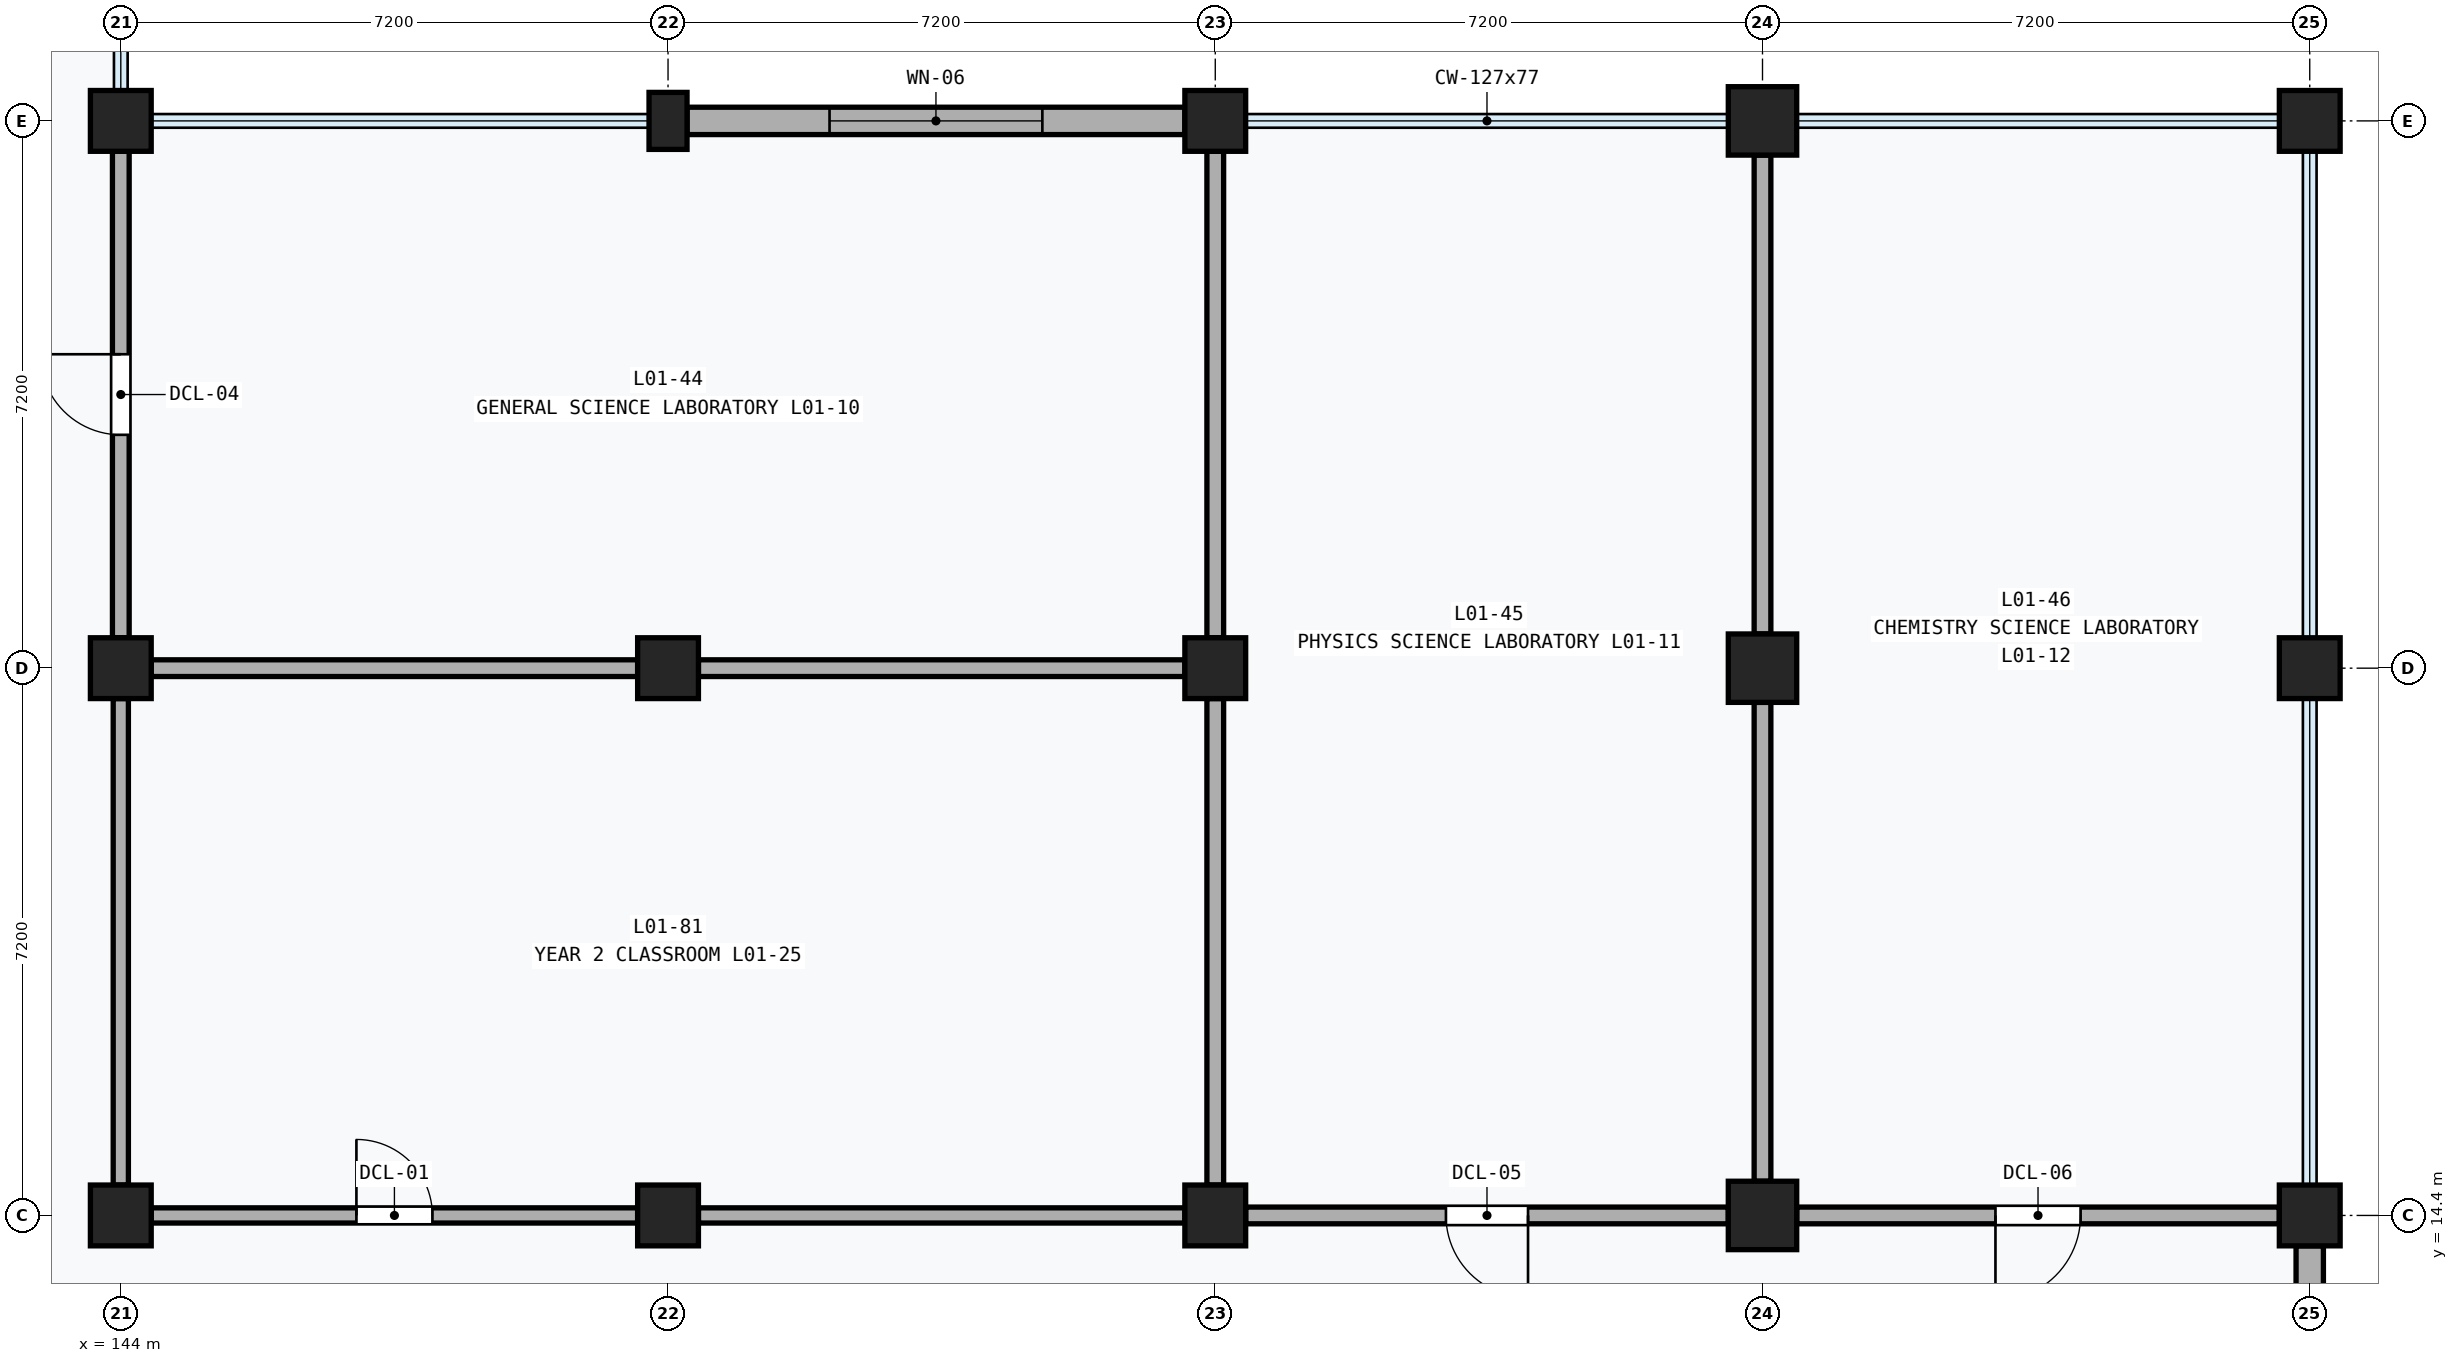
"""IFC4 building model, lengths in metres.
Left out: names, types, materials, properties, quantities, classifications, styles, units other than length and angle.
Written with IfcOpenShell. Run it as: python <this file> out.ifc"""

import sys

from ifc_helpers import new_model, si_unit, direction, frame, frame_2d, origin, origin_2d, place, context, subcontext, project, spatial, rectangle, extrude, element, fill, save


model = new_model("IFC4")
c1 = context("Model", 3, precision=1e-05, world=origin(), true_north=direction((0.0, 1.0)))
c2 = subcontext(c1, "Body", "Model", "MODEL_VIEW")
j1 = project(units=[si_unit("LENGTHUNIT", "METRE"), si_unit("PLANEANGLEUNIT", "RADIAN")], contexts=[c1])
p1 = place(None, origin())
s1 = spatial("IfcSite", under=j1, at=p1, CompositionType="ELEMENT")
p2 = place(p1, origin())
s2 = spatial("IfcBuilding", under=s1, at=p2, CompositionType="ELEMENT")
p3 = place(p2, frame((0.0, 0.0, 4.8)))
s3 = spatial("IfcBuildingStorey", under=s2, at=p3, CompositionType="ELEMENT", Elevation=4.8)
for number, where, z_axis, x_axis in (
    (1, (144.0, 14.4, 0.0), (0.0, 0.0, 1.0), (1.0, 0.0, 0.0)),
    (2, (144.0, 21.6, 0.0), (0.0, 0.0, 1.0), (1.0, 0.0, 0.0)),
    (3, (144.0, 28.8, 0.0), (0.0, 0.0, 1.0), (1.0, 0.0, 0.0)),
    (4, (151.2, 14.4, 0.0), (0.0, 0.0, 1.0), (1.0, 0.0, 0.0)),
    (5, (151.2, 21.6, 0.0), (0.0, 0.0, 1.0), (1.0, 0.0, 0.0)),
):
    element("IfcColumn", number, at=place(p3, frame(where, z_axis=z_axis, x_axis=x_axis)), inside=s3, PredefinedType="COLUMN", context=c2, shape_type="SweptSolid", body=[
        extrude(rectangle(XDim=0.8, YDim=0.8, at=origin_2d()), origin(), (0.0, 0.0, 1.0), 4.8),
    ])
p4 = place(p3, frame((151.2, 28.8, 0.0), z_axis=(0.0, 0.0, 1.0), x_axis=(1.0, 0.0, 0.0)))
e6 = element("IfcColumn", 6, at=p4, inside=s3, PredefinedType="PILASTER", context=c2, shape_type="SweptSolid", body=[
    extrude(rectangle(XDim=0.5, YDim=0.75, at=origin_2d()), origin(), (0.0, 0.0, 1.0), 4.8),
])
for number, where, z_axis, x_axis in (
    (7, (158.4, 14.4, 0.0), (0.0, 0.0, 1.0), (1.0, 0.0, 0.0)),
    (8, (158.4, 21.6, 0.0), (0.0, 0.0, 1.0), (1.0, 0.0, 0.0)),
    (9, (158.4, 28.8, 0.0), (0.0, 0.0, 1.0), (1.0, 0.0, 0.0)),
):
    element("IfcColumn", number, at=place(p3, frame(where, z_axis=z_axis, x_axis=x_axis)), inside=s3, PredefinedType="COLUMN", context=c2, shape_type="SweptSolid", body=[
        extrude(rectangle(XDim=0.8, YDim=0.8, at=origin_2d()), origin(), (0.0, 0.0, 1.0), 4.8),
    ])
for number, where, z_axis, x_axis in (
    (10, (165.6, 14.4, 0.0), (0.0, 0.0, 1.0), (1.0, 0.0, 0.0)),
    (11, (165.6, 21.6, 0.0), (0.0, 0.0, 1.0), (1.0, 0.0, 0.0)),
    (12, (165.6, 28.8, 0.0), (0.0, 0.0, 1.0), (1.0, 0.0, 0.0)),
):
    element("IfcColumn", number, at=place(p3, frame(where, z_axis=z_axis, x_axis=x_axis)), inside=s3, PredefinedType="COLUMN", context=c2, shape_type="SweptSolid", body=[
        extrude(rectangle(XDim=0.9, YDim=0.9, at=origin_2d()), origin(), (0.0, 0.0, 1.0), 4.8),
    ])
for number, where, z_axis, x_axis in (
    (13, (172.8, 14.4, 0.0), (0.0, 0.0, 1.0), (1.0, 0.0, 0.0)),
    (14, (172.8, 21.6, 0.0), (0.0, 0.0, 1.0), (1.0, 0.0, 0.0)),
    (15, (172.8, 28.8, 0.0), (0.0, 0.0, 1.0), (1.0, 0.0, 0.0)),
):
    element("IfcColumn", number, at=place(p3, frame(where, z_axis=z_axis, x_axis=x_axis)), inside=s3, PredefinedType="COLUMN", context=c2, shape_type="SweptSolid", body=[
        extrude(rectangle(XDim=0.8, YDim=0.8, at=origin_2d()), origin(), (0.0, 0.0, 1.0), 4.8),
    ])
p5 = place(p3, frame((151.45, 28.8, 0.0), z_axis=(0.0, 0.0, 1.0), x_axis=(1.0, 0.0, 0.0)))
e16 = element("IfcWall", 16, at=p5, inside=s3, PredefinedType="SOLIDWALL", context=c2, shape_type="SweptSolid", body=[
    extrude(rectangle(XDim=6.55, YDim=0.36, at=frame_2d((3.275, 0.0))), origin(), (0.0, 0.0, 1.0), 3.85),
])
p6 = place(p5, frame((1.875, 0.0, 0.9)))
e17 = element("IfcOpeningElement", 17, at=p6, cuts=e16, PredefinedType="OPENING", context=c2, shape_type="SweptSolid", body=[
    extrude(rectangle(XDim=2.8, YDim=1.8, at=frame_2d((1.4, 0.9))), frame((0.0, 0.192, 0.0), z_axis=(0.0, -1.0, 0.0), x_axis=(1.0, 0.0, 0.0)), (0.0, 0.0, 1.0), 0.384),
])
p7 = place(p3, frame((172.8, 7.575, 0.0), z_axis=(0.0, 0.0, 1.0), x_axis=(0.0, 1.0, 0.0)))
e18 = element("IfcWall", 18, at=p7, inside=s3, PredefinedType="SOLIDWALL", context=c2, shape_type="SweptSolid", body=[
    extrude(rectangle(XDim=6.425, YDim=0.36, at=frame_2d((3.212, 0.0))), origin(), (0.0, 0.0, 1.0), 3.85),
])
p8 = place(p7, frame((1.812, 0.0, 0.9)))
e19 = element("IfcOpeningElement", 19, at=p8, cuts=e18, PredefinedType="OPENING", context=c2, shape_type="SweptSolid", body=[
    extrude(rectangle(XDim=2.8, YDim=1.8, at=frame_2d((1.4, 0.9))), frame((0.0, 0.192, 0.0), z_axis=(0.0, -1.0, 0.0), x_axis=(1.0, 0.0, 0.0)), (0.0, 0.0, 1.0), 0.384),
])
p9 = place(p3, frame((144.4, 21.6, 0.0), z_axis=(0.0, 0.0, 1.0), x_axis=(1.0, 0.0, 0.0)))
e20 = element("IfcWall", 20, at=p9, inside=s3, PredefinedType="PARTITIONING", context=c2, shape_type="SweptSolid", body=[
    extrude(rectangle(XDim=6.4, YDim=0.22, at=frame_2d((3.2, 0.0))), origin(), (0.0, 0.0, 1.0), 3.58),
])
p10 = place(p3, frame((144.0, 22.0, 0.0), z_axis=(0.0, 0.0, 1.0), x_axis=(0.0, 1.0, 0.0)))
e21 = element("IfcWall", 21, at=p10, inside=s3, PredefinedType="PARTITIONING", context=c2, shape_type="SweptSolid", body=[
    extrude(rectangle(XDim=6.4, YDim=0.22, at=frame_2d((3.2, 0.0))), origin(), (0.0, 0.0, 1.0), 3.58),
])
p11 = place(p10, frame((2.67, 0.0, 0.0)))
e22 = element("IfcOpeningElement", 22, at=p11, cuts=e21, PredefinedType="OPENING", context=c2, shape_type="SweptSolid", body=[
    extrude(rectangle(XDim=1.06, YDim=2.16, at=frame_2d((0.53, 1.08))), frame((0.0, 0.122, 0.0), z_axis=(0.0, -1.0, 0.0), x_axis=(1.0, 0.0, 0.0)), (0.0, 0.0, 1.0), 0.244),
])
for number, where, z_axis, x_axis in (
    (23, (151.6, 21.6, 0.0), (0.0, 0.0, 1.0), (1.0, 0.0, 0.0)),
    (24, (158.4, 22.0, 0.0), (0.0, 0.0, 1.0), (0.0, 1.0, 0.0)),
):
    element("IfcWall", number, at=place(p3, frame(where, z_axis=z_axis, x_axis=x_axis)), inside=s3, PredefinedType="PARTITIONING", context=c2, shape_type="SweptSolid", body=[
        extrude(rectangle(XDim=6.4, YDim=0.22, at=frame_2d((3.2, 0.0))), origin(), (0.0, 0.0, 1.0), 3.58),
    ])
p12 = place(p3, frame((158.8, 14.4, 0.0), z_axis=(0.0, 0.0, 1.0), x_axis=(1.0, 0.0, 0.0)))
e25 = element("IfcWall", 25, at=p12, inside=s3, PredefinedType="PARTITIONING", context=c2, shape_type="SweptSolid", body=[
    extrude(rectangle(XDim=6.35, YDim=0.22, at=frame_2d((3.175, 0.0))), origin(), (0.0, 0.0, 1.0), 3.58),
])
p13 = place(p12, frame((2.635, 0.0, 0.0)))
e26 = element("IfcOpeningElement", 26, at=p13, cuts=e25, PredefinedType="OPENING", context=c2, shape_type="SweptSolid", body=[
    extrude(rectangle(XDim=1.08, YDim=2.18, at=frame_2d((0.54, 1.09))), frame((0.0, 0.122, 0.0), z_axis=(0.0, -1.0, 0.0), x_axis=(1.0, 0.0, 0.0)), (0.0, 0.0, 1.0), 0.244),
])
p14 = place(p3, frame((158.4, 14.8, 0.0), z_axis=(0.0, 0.0, 1.0), x_axis=(0.0, 1.0, 0.0)))
e27 = element("IfcWall", 27, at=p14, inside=s3, PredefinedType="PARTITIONING", context=c2, shape_type="SweptSolid", body=[
    extrude(rectangle(XDim=6.4, YDim=0.22, at=frame_2d((3.2, 0.0))), origin(), (0.0, 0.0, 1.0), 3.58),
])
p15 = place(p3, frame((165.6, 14.85, 0.0), z_axis=(0.0, 0.0, 1.0), x_axis=(0.0, 1.0, 0.0)))
e28 = element("IfcWall", 28, at=p15, inside=s3, PredefinedType="PARTITIONING", context=c2, shape_type="SweptSolid", body=[
    extrude(rectangle(XDim=6.3, YDim=0.22, at=frame_2d((3.15, 0.0))), origin(), (0.0, 0.0, 1.0), 3.58),
])
p16 = place(p3, frame((165.6, 22.05, 0.0), z_axis=(0.0, 0.0, 1.0), x_axis=(0.0, 1.0, 0.0)))
e29 = element("IfcWall", 29, at=p16, inside=s3, PredefinedType="PARTITIONING", context=c2, shape_type="SweptSolid", body=[
    extrude(rectangle(XDim=6.3, YDim=0.22, at=frame_2d((3.15, 0.0))), origin(), (0.0, 0.0, 1.0), 3.58),
])
p17 = place(p3, frame((166.05, 14.4, 0.0), z_axis=(0.0, 0.0, 1.0), x_axis=(1.0, 0.0, 0.0)))
e30 = element("IfcWall", 30, at=p17, inside=s3, PredefinedType="PARTITIONING", context=c2, shape_type="SweptSolid", body=[
    extrude(rectangle(XDim=6.35, YDim=0.22, at=frame_2d((3.175, 0.0))), origin(), (0.0, 0.0, 1.0), 3.58),
])
p18 = place(p17, frame((2.615, 0.0, 0.0)))
e31 = element("IfcOpeningElement", 31, at=p18, cuts=e30, PredefinedType="OPENING", context=c2, shape_type="SweptSolid", body=[
    extrude(rectangle(XDim=1.12, YDim=2.2, at=frame_2d((0.56, 1.1))), frame((0.0, 0.122, 0.0), z_axis=(0.0, -1.0, 0.0), x_axis=(1.0, 0.0, 0.0)), (0.0, 0.0, 1.0), 0.244),
])
p19 = place(p3, frame((144.4, 14.4, 0.0), z_axis=(0.0, 0.0, 1.0), x_axis=(1.0, 0.0, 0.0)))
e32 = element("IfcWall", 32, at=p19, inside=s3, PredefinedType="PARTITIONING", context=c2, shape_type="SweptSolid", body=[
    extrude(rectangle(XDim=6.4, YDim=0.2, at=frame_2d((3.2, 0.0))), origin(), (0.0, 0.0, 1.0), 3.58),
])
p20 = place(p19, frame((2.7, 0.0, 0.0)))
e33 = element("IfcOpeningElement", 33, at=p20, cuts=e32, PredefinedType="OPENING", context=c2, shape_type="SweptSolid", body=[
    extrude(rectangle(XDim=1.0, YDim=2.1, at=frame_2d((0.5, 1.05))), frame((0.0, 0.112, 0.0), z_axis=(0.0, -1.0, 0.0), x_axis=(1.0, 0.0, 0.0)), (0.0, 0.0, 1.0), 0.224),
])
for number, where, z_axis, x_axis in (
    (34, (144.0, 14.8, 0.0), (0.0, 0.0, 1.0), (0.0, 1.0, 0.0)),
    (35, (151.6, 14.4, 0.0), (0.0, 0.0, 1.0), (1.0, 0.0, 0.0)),
):
    element("IfcWall", number, at=place(p3, frame(where, z_axis=z_axis, x_axis=x_axis)), inside=s3, PredefinedType="PARTITIONING", context=c2, shape_type="SweptSolid", body=[
        extrude(rectangle(XDim=6.4, YDim=0.2, at=frame_2d((3.2, 0.0))), origin(), (0.0, 0.0, 1.0), 3.58),
    ])
p21 = place(p6, origin())
e36 = element("IfcWindow", 36, at=p21, inside=s3, PartitioningType="SINGLE_PANEL", PredefinedType="WINDOW", context=c2, shape_type="SweptSolid", body=[
    extrude(rectangle(XDim=2.8, YDim=1.8, at=frame_2d((1.4, 0.9))), frame((0.0, 0.03, 0.0), z_axis=(0.0, -1.0, 0.0), x_axis=(1.0, 0.0, 0.0)), (0.0, 0.0, 1.0), 0.06),
])
fill(e17, e36)
p22 = place(p11, origin())
e37 = element("IfcDoor", 37, at=p22, inside=s3, OperationType="SINGLE_SWING_RIGHT", PredefinedType="DOOR", context=c2, shape_type="SweptSolid", body=[
    extrude(rectangle(XDim=1.06, YDim=2.16, at=frame_2d((0.53, 1.08))), frame((0.0, 0.025, 0.0), z_axis=(0.0, -1.0, 0.0), x_axis=(1.0, 0.0, 0.0)), (0.0, 0.0, 1.0), 0.05),
])
fill(e22, e37)
p23 = place(p13, frame((1.08, 0.0, 0.0), z_axis=(0.0, 0.0, 1.0), x_axis=(-1.0, 0.0, 0.0)))
e38 = element("IfcDoor", 38, at=p23, inside=s3, OperationType="SINGLE_SWING_LEFT", PredefinedType="DOOR", context=c2, shape_type="SweptSolid", body=[
    extrude(rectangle(XDim=1.08, YDim=2.18, at=frame_2d((0.54, 1.09))), frame((0.0, 0.025, 0.0), z_axis=(0.0, -1.0, 0.0), x_axis=(1.0, 0.0, 0.0)), (0.0, 0.0, 1.0), 0.05),
])
fill(e26, e38)
p24 = place(p18, frame((1.12, 0.0, 0.0), z_axis=(0.0, 0.0, 1.0), x_axis=(-1.0, 0.0, 0.0)))
e39 = element("IfcDoor", 39, at=p24, inside=s3, OperationType="SINGLE_SWING_RIGHT", PredefinedType="DOOR", context=c2, shape_type="SweptSolid", body=[
    extrude(rectangle(XDim=1.12, YDim=2.2, at=frame_2d((0.56, 1.1))), frame((0.0, 0.025, 0.0), z_axis=(0.0, -1.0, 0.0), x_axis=(1.0, 0.0, 0.0)), (0.0, 0.0, 1.0), 0.05),
])
fill(e31, e39)
p25 = place(p20, origin())
e40 = element("IfcDoor", 40, at=p25, inside=s3, OperationType="SINGLE_SWING_LEFT", PredefinedType="DOOR", context=c2, shape_type="SweptSolid", body=[
    extrude(rectangle(XDim=1.0, YDim=2.1, at=frame_2d((0.5, 1.05))), frame((0.0, 0.025, 0.0), z_axis=(0.0, -1.0, 0.0), x_axis=(1.0, 0.0, 0.0)), (0.0, 0.0, 1.0), 0.05),
])
fill(e33, e40)
save(model, sys.argv[1])
